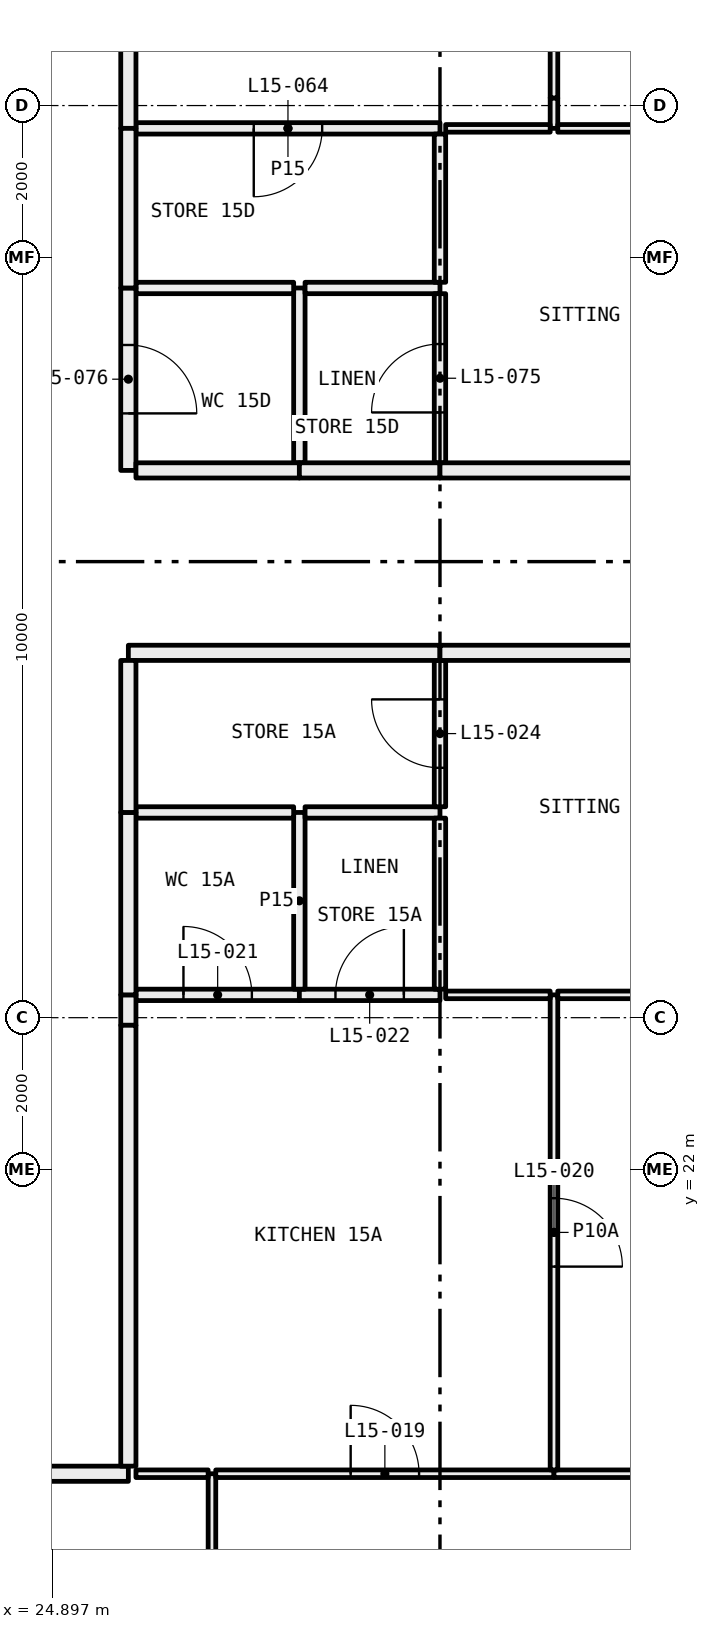
"""IFC4 building model, lengths in metres.
Left out: names, types, materials, properties, quantities, classifications, styles, units other than length and angle.
Written with IfcOpenShell. Run it as: python <this file> out.ifc"""

import sys

from ifc_helpers import new_model, si_unit, direction, frame, frame_2d, origin, place, context, subcontext, project, spatial, rectangle, extrude, element, fill, save


model = new_model("IFC4")
c1 = context("Model", 3, precision=1e-05, world=origin(), true_north=direction((0.0, 1.0)))
c2 = subcontext(c1, "Body", "Model", "MODEL_VIEW")
j1 = project(units=[si_unit("LENGTHUNIT", "METRE"), si_unit("PLANEANGLEUNIT", "RADIAN")], contexts=[c1])
p1 = place(None, origin())
s1 = spatial("IfcSite", under=j1, at=p1, CompositionType="ELEMENT")
p2 = place(p1, origin())
s2 = spatial("IfcBuilding", under=s1, at=p2, CompositionType="ELEMENT")
p3 = place(p2, frame((0.0, 0.0, 64.5)))
s3 = spatial("IfcBuildingStorey", under=s2, at=p3, CompositionType="ELEMENT", Elevation=64.5)
p4 = place(p3, frame((27.0, 12.05, 0.0), z_axis=(0.0, 0.0, 1.0), x_axis=(0.0, 1.0, 0.0)))
e1 = element("IfcWall", 1, at=p4, inside=s3, PredefinedType="PARTITIONING", context=c2, shape_type="SweptSolid", body=[
    extrude(rectangle(XDim=5.95, YDim=0.1, at=frame_2d((2.975, 0.0))), origin(), (0.0, 0.0, 1.0), 2.45),
])
p5 = place(p3, frame((26.95, 18.0, 0.0), z_axis=(0.0, 0.0, 1.0), x_axis=(-1.0, 0.0, 0.0)))
e2 = element("IfcWall", 2, at=p5, inside=s3, PredefinedType="PARTITIONING", context=c2, shape_type="SweptSolid", body=[
    extrude(rectangle(XDim=0.95, YDim=0.1, at=frame_2d((0.475, 0.0))), origin(), (0.0, 0.0, 1.0), 3.05),
])
p6 = place(p3, frame((25.9, 18.0, 0.0), z_axis=(0.0, 0.0, 1.0), x_axis=(-1.0, 0.0, 0.0)))
e3 = element("IfcWall", 3, at=p6, inside=s3, PredefinedType="PARTITIONING", context=c2, shape_type="SweptSolid", body=[
    extrude(rectangle(XDim=7.9, YDim=0.2, at=frame_2d((3.95, 0.0))), origin(), (0.0, 0.0, 1.0), 3.05),
])
p7 = place(p3, frame((31.5, 18.0, 0.0), z_axis=(0.0, 0.0, 1.0), x_axis=(-1.0, 0.0, 0.0)))
e4 = element("IfcWall", 4, at=p7, inside=s3, PredefinedType="PARTITIONING", context=c2, shape_type="SweptSolid", body=[
    extrude(rectangle(XDim=4.45, YDim=0.1, at=frame_2d((2.225, 0.0))), origin(), (0.0, 0.0, 1.0), 3.05),
])
p8 = place(p7, frame((1.775, 0.0, 0.0)))
e5 = element("IfcOpeningElement", 5, at=p8, cuts=e4, PredefinedType="OPENING", context=c2, shape_type="SweptSolid", body=[
    extrude(rectangle(XDim=0.9, YDim=2.1, at=frame_2d((0.45, 1.05))), frame((0.0, 0.06, 0.0), z_axis=(0.0, -1.0, 0.0), x_axis=(1.0, 0.0, 0.0)), (0.0, 0.0, 1.0), 0.12),
])
p9 = place(p3, frame((35.9, 18.0, 0.0), z_axis=(0.0, 0.0, 1.0), x_axis=(-1.0, 0.0, 0.0)))
e6 = element("IfcWall", 6, at=p9, inside=s3, PredefinedType="PARTITIONING", context=c2, shape_type="SweptSolid", body=[
    extrude(rectangle(XDim=4.4, YDim=0.1, at=frame_2d((2.2, 0.0))), origin(), (0.0, 0.0, 1.0), 3.05),
])
p10 = place(p3, frame((31.5, 18.05, 0.0), z_axis=(0.0, 0.0, 1.0), x_axis=(0.0, 1.0, 0.0)))
e7 = element("IfcWall", 7, at=p10, inside=s3, PredefinedType="PARTITIONING", context=c2, shape_type="SweptSolid", body=[
    extrude(rectangle(XDim=6.25, YDim=0.1, at=frame_2d((3.125, 0.0))), origin(), (0.0, 0.0, 1.0), 2.45),
])
p11 = place(p10, frame((2.675, 0.0, 0.0)))
e8 = element("IfcOpeningElement", 8, at=p11, cuts=e7, PredefinedType="OPENING", context=c2, shape_type="SweptSolid", body=[
    extrude(rectangle(XDim=0.9, YDim=2.1, at=frame_2d((0.45, 1.05))), frame((0.0, 0.06, 0.0), z_axis=(0.0, -1.0, 0.0), x_axis=(1.0, 0.0, 0.0)), (0.0, 0.0, 1.0), 0.12),
])
p12 = place(p3, frame((28.15, 24.3, 0.0), z_axis=(0.0, 0.0, 1.0), x_axis=(-1.0, 0.0, 0.0)))
e9 = element("IfcWall", 9, at=p12, inside=s3, PredefinedType="PARTITIONING", context=c2, shape_type="SweptSolid", body=[
    extrude(rectangle(XDim=2.15, YDim=0.15, at=frame_2d((1.075, 0.0))), origin(), (0.0, 0.0, 1.0), 3.05),
])
p13 = place(p12, frame((0.625, 0.0, 0.0)))
e10 = element("IfcOpeningElement", 10, at=p13, cuts=e9, PredefinedType="OPENING", context=c2, shape_type="SweptSolid", body=[
    extrude(rectangle(XDim=0.9, YDim=2.1, at=frame_2d((0.45, 1.05))), frame((0.0, 0.085, 0.0), z_axis=(0.0, -1.0, 0.0), x_axis=(1.0, 0.0, 0.0)), (0.0, 0.0, 1.0), 0.17),
])
p14 = place(p3, frame((30.0, 24.3, 0.0), z_axis=(0.0, 0.0, 1.0), x_axis=(-1.0, 0.0, 0.0)))
e11 = element("IfcWall", 11, at=p14, inside=s3, PredefinedType="PARTITIONING", context=c2, shape_type="SweptSolid", body=[
    extrude(rectangle(XDim=1.85, YDim=0.15, at=frame_2d((0.925, 0.0))), origin(), (0.0, 0.0, 1.0), 3.05),
])
p15 = place(p14, frame((0.475, 0.0, 0.0)))
e12 = element("IfcOpeningElement", 12, at=p15, cuts=e11, PredefinedType="OPENING", context=c2, shape_type="SweptSolid", body=[
    extrude(rectangle(XDim=0.9, YDim=2.1, at=frame_2d((0.45, 1.05))), frame((0.0, 0.085, 0.0), z_axis=(0.0, -1.0, 0.0), x_axis=(1.0, 0.0, 0.0)), (0.0, 0.0, 1.0), 0.17),
])
p16 = place(p3, frame((31.45, 24.3, 0.0), z_axis=(0.0, 0.0, 1.0), x_axis=(-1.0, 0.0, 0.0)))
e13 = element("IfcWall", 13, at=p16, inside=s3, PredefinedType="PARTITIONING", context=c2, shape_type="SweptSolid", body=[
    extrude(rectangle(XDim=1.375, YDim=0.1, at=frame_2d((0.688, 0.0))), origin(), (0.0, 0.0, 1.0), 3.05),
])
p17 = place(p3, frame((25.9, 24.3, 0.0), z_axis=(0.0, 0.0, 1.0), x_axis=(0.0, -1.0, 0.0)))
e14 = element("IfcWall", 14, at=p17, inside=s3, PredefinedType="PARTITIONING", context=c2, shape_type="SweptSolid", body=[
    extrude(rectangle(XDim=0.4, YDim=0.2, at=frame_2d((0.2, 0.0))), origin(), (0.0, 0.0, 1.0), 2.45),
])
p18 = place(p3, frame((25.9, 23.9, 0.0), z_axis=(0.0, 0.0, 1.0), x_axis=(0.0, -1.0, 0.0)))
e15 = element("IfcWall", 15, at=p18, inside=s3, PredefinedType="PARTITIONING", context=c2, shape_type="SweptSolid", body=[
    extrude(rectangle(XDim=5.8, YDim=0.2, at=frame_2d((2.9, 0.0))), origin(), (0.0, 0.0, 1.0), 3.05),
])
p19 = place(p3, frame((35.2, 24.3, 0.0), z_axis=(0.0, 0.0, 1.0), x_axis=(-1.0, 0.0, 0.0)))
e16 = element("IfcWall", 16, at=p19, inside=s3, PredefinedType="PARTITIONING", context=c2, shape_type="SweptSolid", body=[
    extrude(rectangle(XDim=3.65, YDim=0.1, at=frame_2d((1.825, 0.0))), origin(), (0.0, 0.0, 1.0), 3.05),
])
p20 = place(p19, frame((1.375, 0.0, 0.0)))
e17 = element("IfcOpeningElement", 17, at=p20, cuts=e16, PredefinedType="OPENING", context=c2, shape_type="SweptSolid", body=[
    extrude(rectangle(XDim=0.9, YDim=2.1, at=frame_2d((0.45, 1.05))), frame((0.0, 0.06, 0.0), z_axis=(0.0, -1.0, 0.0), x_axis=(1.0, 0.0, 0.0)), (0.0, 0.0, 1.0), 0.12),
])
p21 = place(p3, frame((28.15, 24.375, 0.0), z_axis=(0.0, 0.0, 1.0), x_axis=(0.0, 1.0, 0.0)))
e18 = element("IfcWall", 18, at=p21, inside=s3, PredefinedType="PARTITIONING", context=c2, shape_type="SweptSolid", body=[
    extrude(rectangle(XDim=2.325, YDim=0.15, at=frame_2d((1.163, 0.0))), origin(), (0.0, 0.0, 1.0), 3.05),
])
p22 = place(p3, frame((28.075, 26.7, 0.0), z_axis=(0.0, 0.0, 1.0), x_axis=(-1.0, 0.0, 0.0)))
e19 = element("IfcWall", 19, at=p22, inside=s3, PredefinedType="PARTITIONING", context=c2, shape_type="SweptSolid", body=[
    extrude(rectangle(XDim=2.075, YDim=0.15, at=frame_2d((1.038, 0.0))), origin(), (0.0, 0.0, 1.0), 3.05),
])
p23 = place(p3, frame((25.9, 26.7, 0.0), z_axis=(0.0, 0.0, 1.0), x_axis=(0.0, -1.0, 0.0)))
e20 = element("IfcWall", 20, at=p23, inside=s3, PredefinedType="PARTITIONING", context=c2, shape_type="SweptSolid", body=[
    extrude(rectangle(XDim=2.4, YDim=0.2, at=frame_2d((1.2, 0.0))), origin(), (0.0, 0.0, 1.0), 3.05),
])
p24 = place(p3, frame((30.0, 26.7, 0.0), z_axis=(0.0, 0.0, 1.0), x_axis=(-1.0, 0.0, 0.0)))
e21 = element("IfcWall", 21, at=p24, inside=s3, PredefinedType="PARTITIONING", context=c2, shape_type="SweptSolid", body=[
    extrude(rectangle(XDim=1.775, YDim=0.15, at=frame_2d((0.887, 0.0))), origin(), (0.0, 0.0, 1.0), 3.05),
])
p25 = place(p3, frame((30.0, 24.375, 0.0), z_axis=(0.0, 0.0, 1.0), x_axis=(0.0, 1.0, 0.0)))
e22 = element("IfcWall", 22, at=p25, inside=s3, PredefinedType="PARTITIONING", context=c2, shape_type="SweptSolid", body=[
    extrude(rectangle(XDim=2.25, YDim=0.15, at=frame_2d((1.125, 0.0))), origin(), (0.0, 0.0, 1.0), 3.05),
])
p26 = place(p3, frame((30.0, 26.775, 0.0), z_axis=(0.0, 0.0, 1.0), x_axis=(0.0, 1.0, 0.0)))
e23 = element("IfcWall", 23, at=p26, inside=s3, PredefinedType="PARTITIONING", context=c2, shape_type="SweptSolid", body=[
    extrude(rectangle(XDim=1.925, YDim=0.15, at=frame_2d((0.962, 0.0))), origin(), (0.0, 0.0, 1.0), 3.05),
])
p27 = place(p26, frame((0.512, 0.0, 0.0)))
e24 = element("IfcOpeningElement", 24, at=p27, cuts=e23, PredefinedType="OPENING", context=c2, shape_type="SweptSolid", body=[
    extrude(rectangle(XDim=0.9, YDim=2.1, at=frame_2d((0.45, 1.05))), frame((0.0, 0.085, 0.0), z_axis=(0.0, -1.0, 0.0), x_axis=(1.0, 0.0, 0.0)), (0.0, 0.0, 1.0), 0.17),
])
p28 = place(p3, frame((30.0, 28.8, 0.0), z_axis=(0.0, 0.0, 1.0), x_axis=(-1.0, 0.0, 0.0)))
e25 = element("IfcWall", 25, at=p28, inside=s3, PredefinedType="PARTITIONING", context=c2, shape_type="SweptSolid", body=[
    extrude(rectangle(XDim=4.1, YDim=0.2, at=frame_2d((2.05, 0.0))), origin(), (0.0, 0.0, 1.0), 3.05),
])
p29 = place(p3, frame((25.9, 28.7, 0.0), z_axis=(0.0, 0.0, 1.0), x_axis=(0.0, -1.0, 0.0)))
e26 = element("IfcWall", 26, at=p29, inside=s3, PredefinedType="PARTITIONING", context=c2, shape_type="SweptSolid", body=[
    extrude(rectangle(XDim=2.0, YDim=0.2, at=frame_2d((1.0, 0.0))), origin(), (0.0, 0.0, 1.0), 3.05),
])
p30 = place(p3, frame((35.9, 28.8, 0.0), z_axis=(0.0, 0.0, 1.0), x_axis=(-1.0, 0.0, 0.0)))
e27 = element("IfcWall", 27, at=p30, inside=s3, PredefinedType="PARTITIONING", context=c2, shape_type="SweptSolid", body=[
    extrude(rectangle(XDim=5.9, YDim=0.2, at=frame_2d((2.95, 0.0))), origin(), (0.0, 0.0, 1.0), 3.05),
])
p31 = place(p3, frame((31.5, 35.7, 0.0), z_axis=(0.0, 0.0, 1.0), x_axis=(0.0, 1.0, 0.0)))
e28 = element("IfcWall", 28, at=p31, inside=s3, PredefinedType="PARTITIONING", context=c2, shape_type="SweptSolid", body=[
    extrude(rectangle(XDim=0.4, YDim=0.1, at=frame_2d((0.2, 0.0))), origin(), (0.0, 0.0, 1.0), 2.45),
])
p32 = place(p3, frame((31.5, 36.1, 0.0), z_axis=(0.0, 0.0, 1.0), x_axis=(0.0, 1.0, 0.0)))
e29 = element("IfcWall", 29, at=p32, inside=s3, PredefinedType="PARTITIONING", context=c2, shape_type="SweptSolid", body=[
    extrude(rectangle(XDim=5.825, YDim=0.1, at=frame_2d((2.913, 0.0))), origin(), (0.0, 0.0, 1.0), 3.05),
])
p33 = place(p32, frame((2.462, 0.0, 0.0)))
e30 = element("IfcOpeningElement", 30, at=p33, cuts=e29, PredefinedType="OPENING", context=c2, shape_type="SweptSolid", body=[
    extrude(rectangle(XDim=0.9, YDim=2.1, at=frame_2d((0.45, 1.05))), frame((0.0, 0.06, 0.0), z_axis=(0.0, -1.0, 0.0), x_axis=(1.0, 0.0, 0.0)), (0.0, 0.0, 1.0), 0.12),
])
p34 = place(p3, frame((26.0, 35.7, 0.0), z_axis=(0.0, 0.0, 1.0), x_axis=(1.0, 0.0, 0.0)))
e31 = element("IfcWall", 31, at=p34, inside=s3, PredefinedType="PARTITIONING", context=c2, shape_type="SweptSolid", body=[
    extrude(rectangle(XDim=4.0, YDim=0.15, at=frame_2d((2.0, 0.0))), origin(), (0.0, 0.0, 1.0), 3.05),
])
p35 = place(p34, frame((1.55, 0.0, 0.0)))
e32 = element("IfcOpeningElement", 32, at=p35, cuts=e31, PredefinedType="OPENING", context=c2, shape_type="SweptSolid", body=[
    extrude(rectangle(XDim=0.9, YDim=2.1, at=frame_2d((0.45, 1.05))), frame((0.0, 0.085, 0.0), z_axis=(0.0, -1.0, 0.0), x_axis=(1.0, 0.0, 0.0)), (0.0, 0.0, 1.0), 0.17),
])
p36 = place(p3, frame((30.075, 35.7, 0.0), z_axis=(0.0, 0.0, 1.0), x_axis=(1.0, 0.0, 0.0)))
e33 = element("IfcWall", 33, at=p36, inside=s3, PredefinedType="PARTITIONING", context=c2, shape_type="SweptSolid", body=[
    extrude(rectangle(XDim=1.375, YDim=0.1, at=frame_2d((0.688, 0.0))), origin(), (0.0, 0.0, 1.0), 3.05),
])
p37 = place(p3, frame((25.9, 41.9, 0.0), z_axis=(0.0, 0.0, 1.0), x_axis=(0.0, -1.0, 0.0)))
e34 = element("IfcWall", 34, at=p37, inside=s3, PredefinedType="PARTITIONING", context=c2, shape_type="SweptSolid", body=[
    extrude(rectangle(XDim=6.2, YDim=0.2, at=frame_2d((3.1, 0.0))), origin(), (0.0, 0.0, 1.0), 2.45),
])
p38 = place(p3, frame((31.55, 35.7, 0.0), z_axis=(0.0, 0.0, 1.0), x_axis=(1.0, 0.0, 0.0)))
e35 = element("IfcWall", 35, at=p38, inside=s3, PredefinedType="PARTITIONING", context=c2, shape_type="SweptSolid", body=[
    extrude(rectangle(XDim=3.65, YDim=0.1, at=frame_2d((1.825, 0.0))), origin(), (0.0, 0.0, 1.0), 3.05),
])
p39 = place(p38, frame((1.375, 0.0, 0.0)))
e36 = element("IfcOpeningElement", 36, at=p39, cuts=e35, PredefinedType="OPENING", context=c2, shape_type="SweptSolid", body=[
    extrude(rectangle(XDim=0.9, YDim=2.1, at=frame_2d((0.45, 1.05))), frame((0.0, 0.06, 0.0), z_axis=(0.0, -1.0, 0.0), x_axis=(1.0, 0.0, 0.0)), (0.0, 0.0, 1.0), 0.12),
])
p40 = place(p3, frame((28.15, 31.3, 0.0), z_axis=(0.0, 0.0, 1.0), x_axis=(0.0, 1.0, 0.0)))
e37 = element("IfcWall", 37, at=p40, inside=s3, PredefinedType="PARTITIONING", context=c2, shape_type="SweptSolid", body=[
    extrude(rectangle(XDim=2.3, YDim=0.15, at=frame_2d((1.15, 0.0))), origin(), (0.0, 0.0, 1.0), 3.05),
])
p41 = place(p3, frame((28.075, 33.6, 0.0), z_axis=(0.0, 0.0, 1.0), x_axis=(-1.0, 0.0, 0.0)))
e38 = element("IfcWall", 38, at=p41, inside=s3, PredefinedType="PARTITIONING", context=c2, shape_type="SweptSolid", body=[
    extrude(rectangle(XDim=2.075, YDim=0.15, at=frame_2d((1.038, 0.0))), origin(), (0.0, 0.0, 1.0), 3.05),
])
p42 = place(p3, frame((25.9, 33.6, 0.0), z_axis=(0.0, 0.0, 1.0), x_axis=(0.0, -1.0, 0.0)))
e39 = element("IfcWall", 39, at=p42, inside=s3, PredefinedType="PARTITIONING", context=c2, shape_type="SweptSolid", body=[
    extrude(rectangle(XDim=2.4, YDim=0.2, at=frame_2d((1.2, 0.0))), origin(), (0.0, 0.0, 1.0), 3.05),
])
p43 = place(p42, frame((0.75, 0.0, 0.0)))
e40 = element("IfcOpeningElement", 40, at=p43, cuts=e39, PredefinedType="OPENING", context=c2, shape_type="SweptSolid", body=[
    extrude(rectangle(XDim=0.9, YDim=2.1, at=frame_2d((0.45, 1.05))), frame((0.0, 0.11, 0.0), z_axis=(0.0, -1.0, 0.0), x_axis=(1.0, 0.0, 0.0)), (0.0, 0.0, 1.0), 0.22),
])
p44 = place(p3, frame((26.0, 31.2, 0.0), z_axis=(0.0, 0.0, 1.0), x_axis=(1.0, 0.0, 0.0)))
e41 = element("IfcWall", 41, at=p44, inside=s3, PredefinedType="PARTITIONING", context=c2, shape_type="SweptSolid", body=[
    extrude(rectangle(XDim=2.15, YDim=0.2, at=frame_2d((1.075, 0.0))), origin(), (0.0, 0.0, 1.0), 3.05),
])
p45 = place(p3, frame((30.0, 33.6, 0.0), z_axis=(0.0, 0.0, 1.0), x_axis=(-1.0, 0.0, 0.0)))
e42 = element("IfcWall", 42, at=p45, inside=s3, PredefinedType="PARTITIONING", context=c2, shape_type="SweptSolid", body=[
    extrude(rectangle(XDim=1.775, YDim=0.15, at=frame_2d((0.887, 0.0))), origin(), (0.0, 0.0, 1.0), 3.05),
])
p46 = place(p3, frame((30.0, 31.3, 0.0), z_axis=(0.0, 0.0, 1.0), x_axis=(0.0, 1.0, 0.0)))
e43 = element("IfcWall", 43, at=p46, inside=s3, PredefinedType="PARTITIONING", context=c2, shape_type="SweptSolid", body=[
    extrude(rectangle(XDim=2.225, YDim=0.15, at=frame_2d((1.112, 0.0))), origin(), (0.0, 0.0, 1.0), 3.05),
])
p47 = place(p46, frame((0.663, 0.0, 0.0)))
e44 = element("IfcOpeningElement", 44, at=p47, cuts=e43, PredefinedType="OPENING", context=c2, shape_type="SweptSolid", body=[
    extrude(rectangle(XDim=0.9, YDim=2.1, at=frame_2d((0.45, 1.05))), frame((0.0, 0.085, 0.0), z_axis=(0.0, -1.0, 0.0), x_axis=(1.0, 0.0, 0.0)), (0.0, 0.0, 1.0), 0.17),
])
p48 = place(p3, frame((28.15, 31.2, 0.0), z_axis=(0.0, 0.0, 1.0), x_axis=(1.0, 0.0, 0.0)))
e45 = element("IfcWall", 45, at=p48, inside=s3, PredefinedType="PARTITIONING", context=c2, shape_type="SweptSolid", body=[
    extrude(rectangle(XDim=1.85, YDim=0.2, at=frame_2d((0.925, 0.0))), origin(), (0.0, 0.0, 1.0), 3.05),
])
p49 = place(p3, frame((30.0, 33.675, 0.0), z_axis=(0.0, 0.0, 1.0), x_axis=(0.0, 1.0, 0.0)))
e46 = element("IfcWall", 46, at=p49, inside=s3, PredefinedType="PARTITIONING", context=c2, shape_type="SweptSolid", body=[
    extrude(rectangle(XDim=1.95, YDim=0.15, at=frame_2d((0.975, 0.0))), origin(), (0.0, 0.0, 1.0), 3.05),
])
p50 = place(p3, frame((25.9, 35.7, 0.0), z_axis=(0.0, 0.0, 1.0), x_axis=(0.0, -1.0, 0.0)))
e47 = element("IfcWall", 47, at=p50, inside=s3, PredefinedType="PARTITIONING", context=c2, shape_type="SweptSolid", body=[
    extrude(rectangle(XDim=2.1, YDim=0.2, at=frame_2d((1.05, 0.0))), origin(), (0.0, 0.0, 1.0), 3.05),
])
p51 = place(p3, frame((30.0, 31.2, 0.0), z_axis=(0.0, 0.0, 1.0), x_axis=(1.0, 0.0, 0.0)))
e48 = element("IfcWall", 48, at=p51, inside=s3, PredefinedType="PARTITIONING", context=c2, shape_type="SweptSolid", body=[
    extrude(rectangle(XDim=6.0, YDim=0.2, at=frame_2d((3.0, 0.0))), origin(), (0.0, 0.0, 1.0), 2.45),
])
p52 = place(p8, frame((0.9, 0.0, 0.0), x_axis=(-1.0, 0.0, 0.0)))
e49 = element("IfcDoor", 49, at=p52, inside=s3, OperationType="SINGLE_SWING_RIGHT", PredefinedType="DOOR", context=c2, shape_type="SweptSolid", body=[
    extrude(rectangle(XDim=0.9, YDim=2.1, at=frame_2d((0.45, 1.05))), frame((0.0, 0.025, 0.0), z_axis=(0.0, -1.0, 0.0), x_axis=(1.0, 0.0, 0.0)), (0.0, 0.0, 1.0), 0.05),
])
fill(e5, e49)
p53 = place(p11, frame((0.9, 0.0, 0.0), x_axis=(-1.0, 0.0, 0.0)))
e50 = element("IfcDoor", 50, at=p53, inside=s3, OperationType="SINGLE_SWING_LEFT", PredefinedType="DOOR", context=c2, shape_type="SweptSolid", body=[
    extrude(rectangle(XDim=0.9, YDim=2.1, at=frame_2d((0.45, 1.05))), frame((0.0, 0.025, 0.0), z_axis=(0.0, -1.0, 0.0), x_axis=(1.0, 0.0, 0.0)), (0.0, 0.0, 1.0), 0.05),
])
fill(e8, e50)
p54 = place(p13, frame((0.9, 0.0, 0.0), x_axis=(-1.0, 0.0, 0.0)))
e51 = element("IfcDoor", 51, at=p54, inside=s3, OperationType="SINGLE_SWING_RIGHT", PredefinedType="DOOR", context=c2, shape_type="SweptSolid", body=[
    extrude(rectangle(XDim=0.9, YDim=2.1, at=frame_2d((0.45, 1.05))), frame((0.0, 0.025, 0.0), z_axis=(0.0, -1.0, 0.0), x_axis=(1.0, 0.0, 0.0)), (0.0, 0.0, 1.0), 0.05),
])
fill(e10, e51)
p55 = place(p15, frame((0.9, 0.0, 0.0), x_axis=(-1.0, 0.0, 0.0)))
e52 = element("IfcDoor", 52, at=p55, inside=s3, OperationType="SINGLE_SWING_LEFT", PredefinedType="DOOR", context=c2, shape_type="SweptSolid", body=[
    extrude(rectangle(XDim=0.9, YDim=2.1, at=frame_2d((0.45, 1.05))), frame((0.0, 0.025, 0.0), z_axis=(0.0, -1.0, 0.0), x_axis=(1.0, 0.0, 0.0)), (0.0, 0.0, 1.0), 0.05),
])
fill(e12, e52)
p56 = place(p27, origin())
e53 = element("IfcDoor", 53, at=p56, inside=s3, OperationType="SINGLE_SWING_LEFT", PredefinedType="DOOR", context=c2, shape_type="SweptSolid", body=[
    extrude(rectangle(XDim=0.9, YDim=2.1, at=frame_2d((0.45, 1.05))), frame((0.0, 0.025, 0.0), z_axis=(0.0, -1.0, 0.0), x_axis=(1.0, 0.0, 0.0)), (0.0, 0.0, 1.0), 0.05),
])
fill(e24, e53)
p57 = place(p35, frame((0.9, 0.0, 0.0), x_axis=(-1.0, 0.0, 0.0)))
e54 = element("IfcDoor", 54, at=p57, inside=s3, OperationType="SINGLE_SWING_LEFT", PredefinedType="DOOR", context=c2, shape_type="SweptSolid", body=[
    extrude(rectangle(XDim=0.9, YDim=2.1, at=frame_2d((0.45, 1.05))), frame((0.0, 0.025, 0.0), z_axis=(0.0, -1.0, 0.0), x_axis=(1.0, 0.0, 0.0)), (0.0, 0.0, 1.0), 0.05),
])
fill(e32, e54)
p58 = place(p47, origin())
e55 = element("IfcDoor", 55, at=p58, inside=s3, OperationType="SINGLE_SWING_RIGHT", PredefinedType="DOOR", context=c2, shape_type="SweptSolid", body=[
    extrude(rectangle(XDim=0.9, YDim=2.1, at=frame_2d((0.45, 1.05))), frame((0.0, 0.025, 0.0), z_axis=(0.0, -1.0, 0.0), x_axis=(1.0, 0.0, 0.0)), (0.0, 0.0, 1.0), 0.05),
])
fill(e44, e55)
p59 = place(p43, origin())
e56 = element("IfcDoor", 56, at=p59, inside=s3, OperationType="SINGLE_SWING_LEFT", PredefinedType="DOOR", context=c2, shape_type="SweptSolid", body=[
    extrude(rectangle(XDim=0.9, YDim=2.1, at=frame_2d((0.45, 1.05))), frame((0.0, 0.025, 0.0), z_axis=(0.0, -1.0, 0.0), x_axis=(1.0, 0.0, 0.0)), (0.0, 0.0, 1.0), 0.05),
])
fill(e40, e56)
save(model, sys.argv[1])
